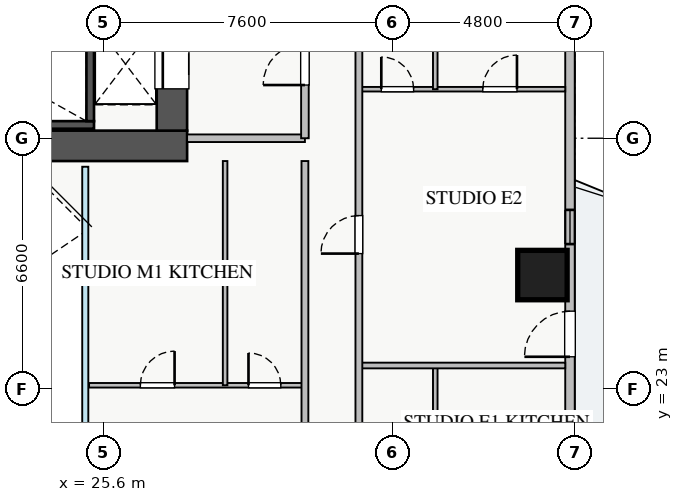
"""IFC4 building model, lengths in metres.
Left out: names, types, materials, properties, quantities, classifications, styles, units other than length and angle.
Written with IfcOpenShell. Run it as: python <this file> out.ifc"""

import sys

from ifc_helpers import new_model, si_unit, direction, frame, frame_2d, origin, origin_2d, place, context, subcontext, project, spatial, rectangle, extrude, source, transform, mapped, element, fill, save


model = new_model("IFC4")
c1 = context("Model", 3, precision=1e-05, world=origin(), true_north=direction((0.0, 1.0)))
c2 = subcontext(c1, "Body", "Model", "MODEL_VIEW")
j1 = project(units=[si_unit("LENGTHUNIT", "METRE"), si_unit("PLANEANGLEUNIT", "RADIAN")], contexts=[c1])
p1 = place(None, origin())
s1 = spatial("IfcSite", under=j1, at=p1, CompositionType="ELEMENT")
p2 = place(p1, origin())
s2 = spatial("IfcBuilding", under=s1, at=p2, CompositionType="ELEMENT")
p3 = place(p2, frame((0.0, 0.0, 73.0)))
s3 = spatial("IfcBuildingStorey", under=s2, at=p3, CompositionType="ELEMENT", Elevation=73.0)
p4 = place(p3, frame((18.2, 29.95, 0.0), z_axis=(0.0, 0.0, 1.0), x_axis=(1.0, 0.0, 0.0)))
e1 = element("IfcWall", 1, at=p4, inside=s3, PredefinedType="SHEAR", context=c2, shape_type="SweptSolid", body=[
    extrude(rectangle(XDim=7.15, YDim=0.2, at=frame_2d((3.575, 0.0))), origin(), (0.0, 0.0, 1.0), 3.25),
])
p5 = place(p3, frame((25.25, 30.05, 0.0), z_axis=(0.0, 0.0, 1.0), x_axis=(0.0, 1.0, 0.0)))
e2 = element("IfcWall", 2, at=p5, inside=s3, PredefinedType="SHEAR", context=c2, shape_type="SweptSolid", body=[
    extrude(rectangle(XDim=2.94, YDim=0.2, at=frame_2d((1.47, 0.0))), origin(), (0.0, 0.0, 1.0), 3.25),
])
p6 = place(p3, frame((10.2, 29.4, 0.0), z_axis=(0.0, 0.0, 1.0), x_axis=(1.0, 0.0, 0.0)))
e3 = element("IfcWall", 3, at=p6, inside=s3, PredefinedType="SHEAR", context=c2, shape_type="SweptSolid", body=[
    extrude(rectangle(XDim=17.6, YDim=0.8, at=frame_2d((8.8, 0.0))), origin(), (0.0, 0.0, 1.0), 3.25),
])
p7 = place(p3, frame((27.4, 29.8, 0.0), z_axis=(0.0, 0.0, 1.0), x_axis=(0.0, 1.0, 0.0)))
e4 = element("IfcWall", 4, at=p7, inside=s3, PredefinedType="SHEAR", context=c2, shape_type="SweptSolid", body=[
    extrude(rectangle(XDim=5.6, YDim=0.8, at=frame_2d((2.8, 0.0))), origin(), (0.0, 0.0, 1.0), 3.25),
])
p8 = place(p7, frame((1.1, 0.0, 0.0)))
e5 = element("IfcOpeningElement", 5, at=p8, cuts=e4, PredefinedType="OPENING", context=c2, shape_type="SweptSolid", body=[
    extrude(rectangle(XDim=1.3, YDim=2.05, at=frame_2d((0.65, 1.025))), frame((0.0, 0.41, 0.0), z_axis=(0.0, -1.0, 0.0), x_axis=(1.0, 0.0, 0.0)), (0.0, 0.0, 1.0), 0.82),
])
m1 = source(origin(), c2, "Body", "SweptSolid", [
    extrude(rectangle(XDim=1.3, YDim=1.3, at=origin_2d()), origin(), (0.0, 0.0, 1.0), 3.25),
])
p9 = place(p3, frame((37.15, 26.0, 0.0), z_axis=(0.0, 0.0, 1.0), x_axis=(1.0, 0.0, 0.0)))
e6 = element("IfcColumn", 6, at=p9, inside=s3, PredefinedType="COLUMN", context=c2, shape_type="MappedRepresentation", body=[
    mapped(m1, transform((0.0, 0.0, 0.0), x_axis=(1.0, 0.0, 0.0), y_axis=(0.0, 1.0, 0.0), z_axis=(0.0, 0.0, 1.0), scale=1.0)),
])
p10 = place(p3, frame((37.875, 9.45, 0.0), z_axis=(0.0, 0.0, 1.0), x_axis=(0.0, 1.0, 0.0)))
e7 = element("IfcWall", 7, at=p10, inside=s3, PredefinedType="STANDARD", context=c2, shape_type="SweptSolid", body=[
    extrude(rectangle(XDim=27.1, YDim=0.25, at=frame_2d((13.55, 0.0))), origin(), (0.0, 0.0, 1.0), 2.61),
])
p11 = place(p10, frame((14.4, 0.0, 0.0)))
e8 = element("IfcOpeningElement", 8, at=p11, cuts=e7, PredefinedType="OPENING", context=c2, shape_type="SweptSolid", body=[
    extrude(rectangle(XDim=1.2, YDim=2.1, at=frame_2d((0.6, 1.05))), frame((0.0, 0.135, 0.0), z_axis=(0.0, -1.0, 0.0), x_axis=(1.0, 0.0, 0.0)), (0.0, 0.0, 1.0), 0.27),
])
p12 = place(p10, frame((2.188, 0.0, 0.9)))
e9 = element("IfcOpeningElement", 9, at=p12, cuts=e7, PredefinedType="OPENING", context=c2, shape_type="SweptSolid", body=[
    extrude(rectangle(XDim=2.4, YDim=1.48, at=frame_2d((1.2, 0.74))), frame((0.0, 0.135, 0.0), z_axis=(0.0, -1.0, 0.0), x_axis=(1.0, 0.0, 0.0)), (0.0, 0.0, 1.0), 0.27),
])
p13 = place(p10, frame((22.663, 0.0, 0.9)))
e10 = element("IfcOpeningElement", 10, at=p13, cuts=e7, PredefinedType="OPENING", context=c2, shape_type="SweptSolid", body=[
    extrude(rectangle(XDim=2.1, YDim=1.48, at=frame_2d((1.05, 0.74))), frame((0.0, 0.135, 0.0), z_axis=(0.0, -1.0, 0.0), x_axis=(1.0, 0.0, 0.0)), (0.0, 0.0, 1.0), 0.27),
])
p14 = place(p10, frame((17.365, 0.0, 0.9)))
e11 = element("IfcOpeningElement", 11, at=p14, cuts=e7, PredefinedType="OPENING", context=c2, shape_type="SweptSolid", body=[
    extrude(rectangle(XDim=0.9, YDim=1.2, at=frame_2d((0.45, 0.6))), frame((0.0, 0.135, 0.0), z_axis=(0.0, -1.0, 0.0), x_axis=(1.0, 0.0, 0.0)), (0.0, 0.0, 1.0), 0.27),
])
p15 = place(p3, frame((27.8, 29.6, 0.0), z_axis=(0.0, 0.0, 1.0), x_axis=(1.0, 0.0, 0.0)))
e12 = element("IfcWall", 12, at=p15, inside=s3, PredefinedType="PARTITIONING", context=c2, shape_type="SweptSolid", body=[
    extrude(rectangle(XDim=3.1, YDim=0.2, at=frame_2d((1.55, 0.0))), origin(), (0.0, 0.0, 1.0), 3.07),
])
p16 = place(p3, frame((30.9, 29.6, 0.0), z_axis=(0.0, 0.0, 1.0), x_axis=(0.0, 1.0, 0.0)))
e13 = element("IfcWall", 13, at=p16, inside=s3, PredefinedType="PARTITIONING", context=c2, shape_type="SweptSolid", body=[
    extrude(rectangle(XDim=3.9, YDim=0.2, at=frame_2d((1.95, 0.0))), origin(), (0.0, 0.0, 1.0), 3.07),
])
p17 = place(p16, frame((1.4, 0.0, 0.0)))
e14 = element("IfcOpeningElement", 14, at=p17, cuts=e13, PredefinedType="OPENING", context=c2, shape_type="SweptSolid", body=[
    extrude(rectangle(XDim=1.1, YDim=2.05, at=frame_2d((0.55, 1.025))), frame((0.0, 0.11, 0.0), z_axis=(0.0, -1.0, 0.0), x_axis=(1.0, 0.0, 0.0)), (0.0, 0.0, 1.0), 0.22),
])
p18 = place(p3, frame((34.33, 16.86, 0.0), z_axis=(0.0, 0.0, 1.0), x_axis=(0.0, 1.0, 0.0)))
e15 = element("IfcWall", 15, at=p18, inside=s3, PredefinedType="PLUMBINGWALL", context=c2, shape_type="SweptSolid", body=[
    extrude(rectangle(XDim=6.76, YDim=0.12, at=frame_2d((3.38, 0.0))), origin(), (0.0, 0.0, 1.0), 3.07),
])
p19 = place(p3, frame((32.32, 30.89, 0.0), z_axis=(0.0, 0.0, 1.0), x_axis=(1.0, 0.0, 0.0)))
e16 = element("IfcWall", 16, at=p19, inside=s3, PredefinedType="PLUMBINGWALL", context=c2, shape_type="SweptSolid", body=[
    extrude(rectangle(XDim=5.43, YDim=0.12, at=frame_2d((2.715, 0.0))), origin(), (0.0, 0.0, 1.0), 3.07),
])
p20 = place(p19, frame((0.59, 0.0, 0.0)))
e17 = element("IfcOpeningElement", 17, at=p20, cuts=e16, PredefinedType="OPENING", context=c2, shape_type="SweptSolid", body=[
    extrude(rectangle(XDim=0.85, YDim=2.05, at=frame_2d((0.425, 1.025))), frame((0.0, 0.07, 0.0), z_axis=(0.0, -1.0, 0.0), x_axis=(1.0, 0.0, 0.0)), (0.0, 0.0, 1.0), 0.14),
])
p21 = place(p19, frame((3.26, 0.0, 0.0)))
e18 = element("IfcOpeningElement", 18, at=p21, cuts=e16, PredefinedType="OPENING", context=c2, shape_type="SweptSolid", body=[
    extrude(rectangle(XDim=0.9, YDim=2.05, at=frame_2d((0.45, 1.025))), frame((0.0, 0.07, 0.0), z_axis=(0.0, -1.0, 0.0), x_axis=(1.0, 0.0, 0.0)), (0.0, 0.0, 1.0), 0.14),
])
p22 = place(p3, frame((34.33, 30.89, 0.0), z_axis=(0.0, 0.0, 1.0), x_axis=(0.0, 1.0, 0.0)))
e19 = element("IfcWall", 19, at=p22, inside=s3, PredefinedType="PLUMBINGWALL", context=c2, shape_type="SweptSolid", body=[
    extrude(rectangle(XDim=6.19, YDim=0.12, at=frame_2d((3.095, 0.0))), origin(), (0.0, 0.0, 1.0), 3.07),
])
p23 = place(p3, frame((32.32, 23.62, 0.0), z_axis=(0.0, 0.0, 1.0), x_axis=(1.0, 0.0, 0.0)))
e20 = element("IfcWall", 20, at=p23, inside=s3, PredefinedType="PARTITIONING", context=c2, shape_type="SweptSolid", body=[
    extrude(rectangle(XDim=5.43, YDim=0.15, at=frame_2d((2.715, 0.0))), origin(), (0.0, 0.0, 1.0), 3.07),
])
p24 = place(p3, frame((32.32, 7.21, 0.0), z_axis=(0.0, 0.0, 1.0), x_axis=(0.0, 1.0, 0.0)))
e21 = element("IfcWall", 21, at=p24, inside=s3, PredefinedType="PARTITIONING", context=c2, shape_type="SweptSolid", body=[
    extrude(rectangle(XDim=31.23, YDim=0.18, at=frame_2d((15.615, 0.0))), origin(), (0.0, 0.0, 1.0), 2.771),
])
p25 = place(p24, frame((30.09, 0.0, 0.0)))
e22 = element("IfcOpeningElement", 22, at=p25, cuts=e21, PredefinedType="OPENING", context=c2, shape_type="SweptSolid", body=[
    extrude(rectangle(XDim=0.9, YDim=2.05, at=frame_2d((0.45, 1.025))), frame((0.0, 0.1, 0.0), z_axis=(0.0, -1.0, 0.0), x_axis=(1.0, 0.0, 0.0)), (0.0, 0.0, 1.0), 0.2),
])
p26 = place(p24, frame((0.415, 0.0, 0.0)))
e23 = element("IfcOpeningElement", 23, at=p26, cuts=e21, PredefinedType="OPENING", context=c2, shape_type="SweptSolid", body=[
    extrude(rectangle(XDim=0.9, YDim=2.05, at=frame_2d((0.45, 1.025))), frame((0.0, 0.1, 0.0), z_axis=(0.0, -1.0, 0.0), x_axis=(1.0, 0.0, 0.0)), (0.0, 0.0, 1.0), 0.2),
])
p27 = place(p24, frame((4.99, 0.0, 0.0)))
e24 = element("IfcOpeningElement", 24, at=p27, cuts=e21, PredefinedType="OPENING", context=c2, shape_type="SweptSolid", body=[
    extrude(rectangle(XDim=1.0, YDim=2.05, at=frame_2d((0.5, 1.025))), frame((0.0, 0.1, 0.0), z_axis=(0.0, -1.0, 0.0), x_axis=(1.0, 0.0, 0.0)), (0.0, 0.0, 1.0), 0.2),
])
p28 = place(p24, frame((19.355, 0.0, 0.0)))
e25 = element("IfcOpeningElement", 25, at=p28, cuts=e21, PredefinedType="OPENING", context=c2, shape_type="SweptSolid", body=[
    extrude(rectangle(XDim=1.0, YDim=2.05, at=frame_2d((0.5, 1.025))), frame((0.0, 0.1, 0.0), z_axis=(0.0, -1.0, 0.0), x_axis=(1.0, 0.0, 0.0)), (0.0, 0.0, 1.0), 0.2),
])
p29 = place(p3, frame((25.22, 23.1, 0.0), z_axis=(0.0, 0.0, 1.0), x_axis=(1.0, 0.0, 0.0)))
e26 = element("IfcWall", 26, at=p29, inside=s3, PredefinedType="PLUMBINGWALL", context=c2, shape_type="SweptSolid", body=[
    extrude(rectangle(XDim=5.68, YDim=0.12, at=frame_2d((2.84, 0.0))), origin(), (0.0, 0.0, 1.0), 3.07),
])
p30 = place(p29, frame((1.35, 0.0, 0.0)))
e27 = element("IfcOpeningElement", 27, at=p30, cuts=e26, PredefinedType="OPENING", context=c2, shape_type="SweptSolid", body=[
    extrude(rectangle(XDim=0.9, YDim=2.05, at=frame_2d((0.45, 1.025))), frame((0.0, 0.07, 0.0), z_axis=(0.0, -1.0, 0.0), x_axis=(1.0, 0.0, 0.0)), (0.0, 0.0, 1.0), 0.14),
])
p31 = place(p29, frame((4.195, 0.0, 0.0)))
e28 = element("IfcOpeningElement", 28, at=p31, cuts=e26, PredefinedType="OPENING", context=c2, shape_type="SweptSolid", body=[
    extrude(rectangle(XDim=0.85, YDim=2.05, at=frame_2d((0.425, 1.025))), frame((0.0, 0.07, 0.0), z_axis=(0.0, -1.0, 0.0), x_axis=(1.0, 0.0, 0.0)), (0.0, 0.0, 1.0), 0.14),
])
p32 = place(p3, frame((28.8, 23.1, 0.0), z_axis=(0.0, 0.0, 1.0), x_axis=(0.0, 1.0, 0.0)))
e29 = element("IfcWall", 29, at=p32, inside=s3, PredefinedType="PLUMBINGWALL", context=c2, shape_type="SweptSolid", body=[
    extrude(rectangle(XDim=5.9, YDim=0.12, at=frame_2d((2.95, 0.0))), origin(), (0.0, 0.0, 1.0), 3.07),
])
p33 = place(p3, frame((30.9, 17.0, 0.0), z_axis=(0.0, 0.0, 1.0), x_axis=(0.0, 1.0, 0.0)))
e30 = element("IfcWall", 30, at=p33, inside=s3, PredefinedType="PARTITIONING", context=c2, shape_type="SweptSolid", body=[
    extrude(rectangle(XDim=12.0, YDim=0.18, at=frame_2d((6.0, 0.0))), origin(), (0.0, 0.0, 1.0), 3.07),
])
p34 = place(p33, frame((2.36, 0.0, 0.0)))
e31 = element("IfcOpeningElement", 31, at=p34, cuts=e30, PredefinedType="OPENING", context=c2, shape_type="SweptSolid", body=[
    extrude(rectangle(XDim=1.0, YDim=2.05, at=frame_2d((0.5, 1.025))), frame((0.0, 0.1, 0.0), z_axis=(0.0, -1.0, 0.0), x_axis=(1.0, 0.0, 0.0)), (0.0, 0.0, 1.0), 0.2),
])
m2 = source(origin(), c2, "Body", "SweptSolid", [
    extrude(rectangle(XDim=1.2, YDim=2.1, at=frame_2d((0.6, 1.05))), frame((0.0, 0.025, 0.0), z_axis=(0.0, -1.0, 0.0), x_axis=(1.0, 0.0, 0.0)), (0.0, 0.0, 1.0), 0.05),
])
p35 = place(p11, origin())
e32 = element("IfcDoor", 32, at=p35, inside=s3, OperationType="SINGLE_SWING_LEFT", PredefinedType="DOOR", context=c2, shape_type="MappedRepresentation", body=[
    mapped(m2, transform((0.0, 0.0, 0.0), x_axis=(1.0, 0.0, 0.0), y_axis=(0.0, 1.0, 0.0), z_axis=(0.0, 0.0, 1.0), scale=1.0)),
])
fill(e8, e32)
m3 = source(origin(), c2, "Body", "SweptSolid", [
    extrude(rectangle(XDim=1.3, YDim=2.05, at=frame_2d((0.65, 1.025))), frame((0.0, 0.025, 0.0), z_axis=(0.0, -1.0, 0.0), x_axis=(1.0, 0.0, 0.0)), (0.0, 0.0, 1.0), 0.05),
])
p36 = place(p8, origin())
e33 = element("IfcDoor", 33, at=p36, inside=s3, OperationType="SLIDING_TO_LEFT", PredefinedType="DOOR", context=c2, shape_type="MappedRepresentation", body=[
    mapped(m3, transform((0.0, 0.0, 0.0), x_axis=(1.0, 0.0, 0.0), y_axis=(0.0, 1.0, 0.0), z_axis=(0.0, 0.0, 1.0), scale=1.0)),
])
fill(e5, e33)
m4 = source(origin(), c2, "Body", "SweptSolid", [
    extrude(rectangle(XDim=1.1, YDim=2.05, at=frame_2d((0.55, 1.025))), frame((0.0, 0.025, 0.0), z_axis=(0.0, -1.0, 0.0), x_axis=(1.0, 0.0, 0.0)), (0.0, 0.0, 1.0), 0.05),
])
p37 = place(p17, origin())
e34 = element("IfcDoor", 34, at=p37, inside=s3, OperationType="SINGLE_SWING_LEFT", PredefinedType="DOOR", context=c2, shape_type="MappedRepresentation", body=[
    mapped(m4, transform((0.0, 0.0, 0.0), x_axis=(1.0, 0.0, 0.0), y_axis=(0.0, 1.0, 0.0), z_axis=(0.0, 0.0, 1.0), scale=1.0)),
])
fill(e14, e34)
m5 = source(origin(), c2, "Body", "SweptSolid", [
    extrude(rectangle(XDim=0.85, YDim=2.05, at=frame_2d((0.425, 1.025))), frame((0.0, 0.025, 0.0), z_axis=(0.0, -1.0, 0.0), x_axis=(1.0, 0.0, 0.0)), (0.0, 0.0, 1.0), 0.05),
])
p38 = place(p20, origin())
e35 = element("IfcDoor", 35, at=p38, inside=s3, OperationType="SINGLE_SWING_LEFT", PredefinedType="DOOR", context=c2, shape_type="MappedRepresentation", body=[
    mapped(m5, transform((0.0, 0.0, 0.0), x_axis=(1.0, 0.0, 0.0), y_axis=(0.0, 1.0, 0.0), z_axis=(0.0, 0.0, 1.0), scale=1.0)),
])
fill(e17, e35)
m6 = source(origin(), c2, "Body", "SweptSolid", [
    extrude(rectangle(XDim=0.9, YDim=2.05, at=frame_2d((0.45, 1.025))), frame((0.0, 0.025, 0.0), z_axis=(0.0, -1.0, 0.0), x_axis=(1.0, 0.0, 0.0)), (0.0, 0.0, 1.0), 0.05),
])
p39 = place(p21, origin())
e36 = element("IfcDoor", 36, at=p39, inside=s3, OperationType="SINGLE_SWING_RIGHT", PredefinedType="DOOR", context=c2, shape_type="MappedRepresentation", body=[
    mapped(m6, transform((0.0, 0.0, 0.0), x_axis=(1.0, 0.0, 0.0), y_axis=(0.0, 1.0, 0.0), z_axis=(0.0, 0.0, 1.0), scale=1.0)),
])
fill(e18, e36)
m7 = source(origin(), c2, "Body", "SweptSolid", [
    extrude(rectangle(XDim=1.0, YDim=2.05, at=frame_2d((0.5, 1.025))), frame((0.0, 0.025, 0.0), z_axis=(0.0, -1.0, 0.0), x_axis=(1.0, 0.0, 0.0)), (0.0, 0.0, 1.0), 0.05),
])
p40 = place(p28, origin())
e37 = element("IfcDoor", 37, at=p40, inside=s3, OperationType="SINGLE_SWING_LEFT", PredefinedType="DOOR", context=c2, shape_type="MappedRepresentation", body=[
    mapped(m7, transform((0.0, 0.0, 0.0), x_axis=(1.0, 0.0, 0.0), y_axis=(0.0, 1.0, 0.0), z_axis=(0.0, 0.0, 1.0), scale=1.0)),
])
fill(e25, e37)
p41 = place(p30, origin())
e38 = element("IfcDoor", 38, at=p41, inside=s3, OperationType="SINGLE_SWING_RIGHT", PredefinedType="DOOR", context=c2, shape_type="MappedRepresentation", body=[
    mapped(m6, transform((0.0, 0.0, 0.0), x_axis=(1.0, 0.0, 0.0), y_axis=(0.0, 1.0, 0.0), z_axis=(0.0, 0.0, 1.0), scale=1.0)),
])
fill(e27, e38)
p42 = place(p31, origin())
e39 = element("IfcDoor", 39, at=p42, inside=s3, OperationType="SINGLE_SWING_LEFT", PredefinedType="DOOR", context=c2, shape_type="MappedRepresentation", body=[
    mapped(m5, transform((0.0, 0.0, 0.0), x_axis=(1.0, 0.0, 0.0), y_axis=(0.0, 1.0, 0.0), z_axis=(0.0, 0.0, 1.0), scale=1.0)),
])
fill(e28, e39)
m8 = source(origin(), c2, "Body", "SweptSolid", [
    extrude(rectangle(XDim=0.9, YDim=1.2, at=frame_2d((0.45, 0.6))), frame((0.0, 0.03, 0.0), z_axis=(0.0, -1.0, 0.0), x_axis=(1.0, 0.0, 0.0)), (0.0, 0.0, 1.0), 0.06),
])
p43 = place(p14, origin())
e40 = element("IfcWindow", 40, at=p43, inside=s3, PartitioningType="SINGLE_PANEL", PredefinedType="WINDOW", context=c2, shape_type="MappedRepresentation", body=[
    mapped(m8, transform((0.0, 0.0, 0.0), x_axis=(1.0, 0.0, 0.0), y_axis=(0.0, 1.0, 0.0), z_axis=(0.0, 0.0, 1.0), scale=1.0)),
])
fill(e11, e40)
save(model, sys.argv[1])
